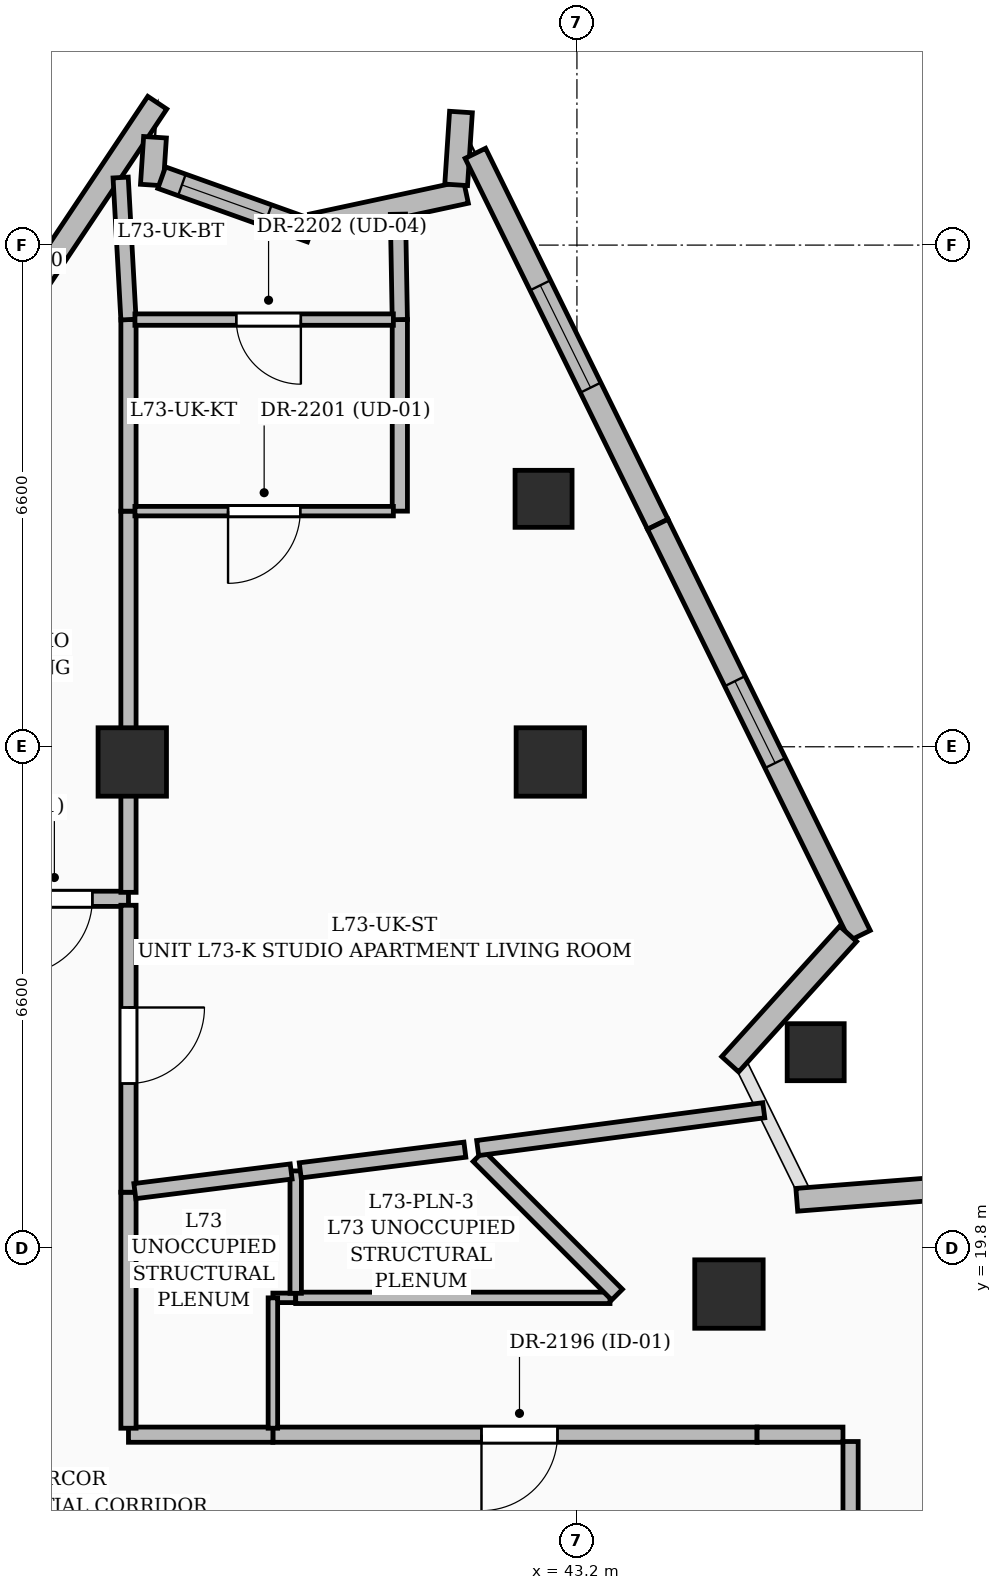
"""IFC4 building model, lengths in metres.
Left out: names, types, materials, properties, quantities, classifications, styles, units other than length and angle.
Written with IfcOpenShell. Run it as: python <this file> out.ifc"""

import sys

from ifc_helpers import new_model, si_unit, direction, frame, frame_2d, origin, origin_2d, place, context, subcontext, project, spatial, rectangle, extrude, element, fill, save


model = new_model("IFC4")
c1 = context("Model", 3, precision=1e-05, world=origin(), true_north=direction((0.0, 1.0)))
c2 = subcontext(c1, "Body", "Model", "MODEL_VIEW")
j1 = project(units=[si_unit("LENGTHUNIT", "METRE"), si_unit("PLANEANGLEUNIT", "RADIAN")], contexts=[c1])
p1 = place(None, origin())
s1 = spatial("IfcSite", under=j1, at=p1, CompositionType="ELEMENT")
p2 = place(p1, origin())
s2 = spatial("IfcBuilding", under=s1, at=p2, CompositionType="ELEMENT")
p3 = place(p2, frame((0.0, 0.0, 282.0)))
s3 = spatial("IfcBuildingStorey", under=s2, at=p3, CompositionType="ELEMENT", Elevation=282.0)
for number, where, z_axis, x_axis in (
    (1, (45.2, 19.2, 0.0), (0.0, 0.0, 1.0), (1.0, 0.0, 0.0)),
    (2, (42.85, 26.2, 0.0), (0.0, 0.0, 1.0), (1.0, 0.0, 0.0)),
    (3, (37.35, 26.2, 0.0), (0.0, 0.0, 1.0), (1.0, 0.0, 0.0)),
):
    element("IfcColumn", number, at=place(p3, frame(where, z_axis=z_axis, x_axis=x_axis)), inside=s3, PredefinedType="COLUMN", context=c2, shape_type="SweptSolid", body=[
        extrude(rectangle(XDim=0.9, YDim=0.9, at=origin_2d()), origin(), (0.0, 0.0, 1.0), 3.75),
    ])
for number, where, z_axis, x_axis in (
    (4, (46.341, 22.382, 0.0), (0.0, 0.0, 1.0), (1.0, 0.0, 0.0)),
    (5, (42.761, 29.662, 0.0), (0.0, 0.0, 1.0), (1.0, 0.0, 0.0)),
):
    element("IfcColumn", number, at=place(p3, frame(where, z_axis=z_axis, x_axis=x_axis)), inside=s3, PredefinedType="COLUMN", context=c2, shape_type="SweptSolid", body=[
        extrude(rectangle(XDim=0.75, YDim=0.75, at=origin_2d()), origin(), (0.0, 0.0, 1.0), 3.75),
    ])
p4 = place(p3, frame((34.191, 29.649, 0.0), z_axis=(0.0, 0.0, 1.0), x_axis=(0.555229286711, 0.831697324259, 0.0)))
e6 = element("IfcWall", 6, at=p4, inside=s3, PredefinedType="SOLIDWALL", context=c2, shape_type="SweptSolid", body=[
    extrude(rectangle(XDim=6.281, YDim=0.3, at=frame_2d((3.141, 0.0))), origin(), (0.0, 0.0, 1.0), 3.5),
])
p5 = place(p4, frame((1.8, 0.0, 0.8)))
e7 = element("IfcOpeningElement", 7, at=p5, cuts=e6, PredefinedType="OPENING", context=c2, shape_type="SweptSolid", body=[
    extrude(rectangle(XDim=1.2, YDim=1.8, at=frame_2d((0.6, 0.9))), frame((0.0, 0.16, 0.0), z_axis=(0.0, -1.0, 0.0), x_axis=(1.0, 0.0, 0.0)), (0.0, 0.0, 1.0), 0.32),
])
p6 = place(p3, frame((37.649, 34.419, 0.0), z_axis=(0.0, 0.0, 1.0), x_axis=(-0.065490172125, -0.997853214333, 0.0)))
e8 = element("IfcWall", 8, at=p6, inside=s3, PredefinedType="SOLIDWALL", context=c2, shape_type="SweptSolid", body=[
    extrude(rectangle(XDim=0.63, YDim=0.3, at=frame_2d((0.315, 0.0))), origin(), (0.0, 0.0, 1.0), 3.5),
])
p7 = place(p3, frame((37.737, 33.887, 0.0), z_axis=(0.0, 0.0, 1.0), x_axis=(0.941665242227, -0.336550994028, 0.0)))
e9 = element("IfcWall", 9, at=p7, inside=s3, PredefinedType="SOLIDWALL", context=c2, shape_type="SweptSolid", body=[
    extrude(rectangle(XDim=2.09, YDim=0.3, at=frame_2d((1.045, 0.0))), origin(), (0.0, 0.0, 1.0), 3.5),
])
p8 = place(p7, frame((0.283, 0.0, 0.8)))
e10 = element("IfcOpeningElement", 10, at=p8, cuts=e9, PredefinedType="OPENING", context=c2, shape_type="SweptSolid", body=[
    extrude(rectangle(XDim=1.2, YDim=1.8, at=frame_2d((0.6, 0.9))), frame((0.0, 0.16, 0.0), z_axis=(0.0, -1.0, 0.0), x_axis=(1.0, 0.0, 0.0)), (0.0, 0.0, 1.0), 0.32),
])
p9 = place(p3, frame((39.715, 33.261, 0.0), z_axis=(0.0, 0.0, 1.0), x_axis=(0.977601927603, 0.210462517201, 0.0)))
e11 = element("IfcWall", 11, at=p9, inside=s3, PredefinedType="SOLIDWALL", context=c2, shape_type="SweptSolid", body=[
    extrude(rectangle(XDim=2.072, YDim=0.3, at=frame_2d((1.036, 0.0))), origin(), (0.0, 0.0, 1.0), 3.5),
])
p10 = place(p3, frame((41.611, 33.793, 0.0), z_axis=(0.0, 0.0, 1.0), x_axis=(0.065860770899, 0.997828822422, 0.0)))
e12 = element("IfcWall", 12, at=p10, inside=s3, PredefinedType="SOLIDWALL", context=c2, shape_type="SweptSolid", body=[
    extrude(rectangle(XDim=0.96, YDim=0.3, at=frame_2d((0.48, 0.0))), origin(), (0.0, 0.0, 1.0), 3.5),
])
p11 = place(p3, frame((41.864, 34.207, 0.0), z_axis=(0.0, 0.0, 1.0), x_axis=(0.441278173843, -0.89737036573, 0.0)))
e13 = element("IfcWall", 13, at=p11, inside=s3, PredefinedType="SOLIDWALL", context=c2, shape_type="SweptSolid", body=[
    extrude(rectangle(XDim=5.438, YDim=0.3, at=frame_2d((2.719, 0.0))), origin(), (0.0, 0.0, 1.0), 3.5),
])
p12 = place(p11, frame((1.935, 0.0, 0.6)))
e14 = element("IfcOpeningElement", 14, at=p12, cuts=e13, PredefinedType="OPENING", context=c2, shape_type="SweptSolid", body=[
    extrude(rectangle(XDim=1.5, YDim=2.1, at=frame_2d((0.75, 1.05))), frame((0.0, 0.16, 0.0), z_axis=(0.0, -1.0, 0.0), x_axis=(1.0, 0.0, 0.0)), (0.0, 0.0, 1.0), 0.32),
])
p13 = place(p3, frame((44.263, 29.327, 0.0), z_axis=(0.0, 0.0, 1.0), x_axis=(0.441323397794, -0.897348125623, 0.0)))
e15 = element("IfcWall", 15, at=p13, inside=s3, PredefinedType="SOLIDWALL", context=c2, shape_type="SweptSolid", body=[
    extrude(rectangle(XDim=6.028, YDim=0.3, at=frame_2d((3.014, 0.0))), origin(), (0.0, 0.0, 1.0), 3.5),
])
p14 = place(p13, frame((2.3, 0.0, 0.8)))
e16 = element("IfcOpeningElement", 16, at=p14, cuts=e15, PredefinedType="OPENING", context=c2, shape_type="SweptSolid", body=[
    extrude(rectangle(XDim=1.2, YDim=1.8, at=frame_2d((0.6, 0.9))), frame((0.0, 0.16, 0.0), z_axis=(0.0, -1.0, 0.0), x_axis=(1.0, 0.0, 0.0)), (0.0, 0.0, 1.0), 0.32),
])
p15 = place(p3, frame((46.768, 23.939, 0.0), z_axis=(0.0, 0.0, 1.0), x_axis=(-0.670764114694, -0.741670750697, 0.0)))
e17 = element("IfcWall", 17, at=p15, inside=s3, PredefinedType="SOLIDWALL", context=c2, shape_type="SweptSolid", body=[
    extrude(rectangle(XDim=2.314, YDim=0.3, at=frame_2d((1.157, 0.0))), origin(), (0.0, 0.0, 1.0), 2.696),
])
p16 = place(p3, frame((46.092, 20.44, 0.0), z_axis=(0.0, 0.0, 1.0), x_axis=(0.996900868101, 0.078668031502, 0.0)))
e18 = element("IfcWall", 18, at=p16, inside=s3, PredefinedType="SOLIDWALL", context=c2, shape_type="SweptSolid", body=[
    extrude(rectangle(XDim=2.594, YDim=0.3, at=frame_2d((1.297, 0.0))), origin(), (0.0, 0.0, 1.0), 2.696),
])
p17 = place(p3, frame((45.57, 17.35, 0.0), z_axis=(0.0, 0.0, 1.0), x_axis=(-1.0, 0.0, 0.0)))
e19 = element("IfcWall", 19, at=p17, inside=s3, PredefinedType="PARTITIONING", context=c2, shape_type="SweptSolid", body=[
    extrude(rectangle(XDim=6.37, YDim=0.2, at=frame_2d((3.185, 0.0))), origin(), (0.0, 0.0, 1.0), 3.5),
])
p18 = place(p17, frame((2.626, 0.0, 0.0)))
e20 = element("IfcOpeningElement", 20, at=p18, cuts=e19, PredefinedType="OPENING", context=c2, shape_type="SweptSolid", body=[
    extrude(rectangle(XDim=1.0, YDim=2.2, at=frame_2d((0.5, 1.1))), frame((0.0, 0.11, 0.0), z_axis=(0.0, -1.0, 0.0), x_axis=(1.0, 0.0, 0.0)), (0.0, 0.0, 1.0), 0.22),
])
p19 = place(p3, frame((39.2, 17.35, 0.0), z_axis=(0.0, 0.0, 1.0), x_axis=(-1.0, 0.0, 0.0)))
e21 = element("IfcWall", 21, at=p19, inside=s3, PredefinedType="PARTITIONING", context=c2, shape_type="SweptSolid", body=[
    extrude(rectangle(XDim=1.9, YDim=0.2, at=frame_2d((0.95, 0.0))), origin(), (0.0, 0.0, 1.0), 3.5),
])
p20 = place(p3, frame((37.3, 17.435, 0.0), z_axis=(0.0, 0.0, 1.0), x_axis=(0.0, 1.0, 0.0)))
e22 = element("IfcWall", 22, at=p20, inside=s3, PredefinedType="PARTITIONING", context=c2, shape_type="SweptSolid", body=[
    extrude(rectangle(XDim=3.105, YDim=0.2, at=frame_2d((1.552, 0.0))), origin(), (0.0, 0.0, 1.0), 3.003),
])
p21 = place(p3, frame((37.3, 24.4, 0.0), z_axis=(0.0, 0.0, 1.0), x_axis=(-1.0, 0.0, 0.0)))
e23 = element("IfcWall", 23, at=p21, inside=s3, PredefinedType="PARTITIONING", context=c2, shape_type="SweptSolid", body=[
    extrude(rectangle(XDim=1.95, YDim=0.2, at=frame_2d((0.975, 0.0))), origin(), (0.0, 0.0, 1.0), 2.685),
])
p22 = place(p21, frame((0.475, 0.0, 0.0)))
e24 = element("IfcOpeningElement", 24, at=p22, cuts=e23, PredefinedType="OPENING", context=c2, shape_type="SweptSolid", body=[
    extrude(rectangle(XDim=1.0, YDim=2.2, at=frame_2d((0.5, 1.1))), frame((0.0, 0.11, 0.0), z_axis=(0.0, -1.0, 0.0), x_axis=(1.0, 0.0, 0.0)), (0.0, 0.0, 1.0), 0.22),
])
p23 = place(p3, frame((37.3, 24.315, 0.0), z_axis=(0.0, 0.0, 1.0), x_axis=(0.0, -1.0, 0.0)))
e25 = element("IfcWall", 25, at=p23, inside=s3, PredefinedType="PARTITIONING", context=c2, shape_type="SweptSolid", body=[
    extrude(rectangle(XDim=3.775, YDim=0.2, at=frame_2d((1.887, 0.0))), origin(), (0.0, 0.0, 1.0), 3.5),
])
p24 = place(p23, frame((1.345, 0.0, 0.0)))
e26 = element("IfcOpeningElement", 26, at=p24, cuts=e25, PredefinedType="OPENING", context=c2, shape_type="SweptSolid", body=[
    extrude(rectangle(XDim=1.0, YDim=2.2, at=frame_2d((0.5, 1.1))), frame((0.0, 0.11, 0.0), z_axis=(0.0, -1.0, 0.0), x_axis=(1.0, 0.0, 0.0)), (0.0, 0.0, 1.0), 0.22),
])
p25 = place(p3, frame((39.5, 19.15, 0.0), z_axis=(0.0, 0.0, 1.0), x_axis=(-1.0, 0.0, 0.0)))
e27 = element("IfcWall", 27, at=p25, inside=s3, PredefinedType="PARTITIONING", context=c2, shape_type="SweptSolid", body=[
    extrude(rectangle(XDim=0.3, YDim=0.125, at=frame_2d((0.15, 0.0))), origin(), (0.0, 0.0, 1.0), 3.003),
])
p26 = place(p3, frame((39.2, 19.15, 0.0), z_axis=(0.0, 0.0, 1.0), x_axis=(0.0, -1.0, 0.0)))
e28 = element("IfcWall", 28, at=p26, inside=s3, PredefinedType="PARTITIONING", context=c2, shape_type="SweptSolid", body=[
    extrude(rectangle(XDim=1.715, YDim=0.125, at=frame_2d((0.857, 0.0))), origin(), (0.0, 0.0, 1.0), 3.003),
])
p27 = place(p3, frame((43.635, 19.15, 0.0), z_axis=(0.0, 0.0, 1.0), x_axis=(-1.0, 0.0, 0.0)))
e29 = element("IfcWall", 29, at=p27, inside=s3, PredefinedType="PARTITIONING", context=c2, shape_type="SweptSolid", body=[
    extrude(rectangle(XDim=4.135, YDim=0.15, at=frame_2d((2.067, 0.0))), origin(), (0.0, 0.0, 1.0), 3.003),
])
p28 = place(p3, frame((39.5, 19.21, 0.0), z_axis=(0.0, 0.0, 1.0), x_axis=(0.0, 1.0, 0.0)))
e30 = element("IfcWall", 30, at=p28, inside=s3, PredefinedType="PARTITIONING", context=c2, shape_type="SweptSolid", body=[
    extrude(rectangle(XDim=1.61, YDim=0.15, at=frame_2d((0.805, 0.0))), origin(), (0.0, 0.0, 1.0), 3.003),
])
p29 = place(p3, frame((39.44, 20.812, 0.0), z_axis=(0.0, 0.0, 1.0), x_axis=(-0.992205225353, -0.124614568901, 0.0)))
e31 = element("IfcWall", 31, at=p29, inside=s3, PredefinedType="PARTITIONING", context=c2, shape_type="SweptSolid", body=[
    extrude(rectangle(XDim=2.073, YDim=0.2, at=frame_2d((1.036, 0.0))), origin(), (0.0, 0.0, 1.0), 3.5),
])
p30 = place(p3, frame((43.728, 19.192, 0.0), z_axis=(0.0, 0.0, 1.0), x_axis=(-0.707106781187, 0.707106781187, 0.0)))
e32 = element("IfcWall", 32, at=p30, inside=s3, PredefinedType="PARTITIONING", context=c2, shape_type="SweptSolid", body=[
    extrude(rectangle(XDim=2.577, YDim=0.2, at=frame_2d((1.288, 0.0))), origin(), (0.0, 0.0, 1.0), 3.003),
])
p31 = place(p3, frame((45.658, 21.618, 0.0), z_axis=(0.0, 0.0, 1.0), x_axis=(-0.991399485906, -0.1308703914, 0.0)))
e33 = element("IfcWall", 33, at=p31, inside=s3, PredefinedType="PARTITIONING", context=c2, shape_type="SweptSolid", body=[
    extrude(rectangle(XDim=3.796, YDim=0.2, at=frame_2d((1.898, 0.0))), origin(), (0.0, 0.0, 1.0), 2.685),
])
p32 = place(p3, frame((37.3, 24.485, 0.0), z_axis=(0.0, 0.0, 1.0), x_axis=(0.0, 1.0, 0.0)))
e34 = element("IfcWall", 34, at=p32, inside=s3, PredefinedType="PARTITIONING", context=c2, shape_type="SweptSolid", body=[
    extrude(rectangle(XDim=5.015, YDim=0.2, at=frame_2d((2.507, 0.0))), origin(), (0.0, 0.0, 1.0), 2.685),
])
p33 = place(p3, frame((37.3, 29.5, 0.0), z_axis=(0.0, 0.0, 1.0), x_axis=(0.0, 1.0, 0.0)))
e35 = element("IfcWall", 35, at=p33, inside=s3, PredefinedType="PARTITIONING", context=c2, shape_type="SweptSolid", body=[
    extrude(rectangle(XDim=2.52, YDim=0.2, at=frame_2d((1.26, 0.0))), origin(), (0.0, 0.0, 1.0), 2.691),
])
p34 = place(p3, frame((37.3, 32.02, 0.0), z_axis=(0.0, 0.0, 1.0), x_axis=(-0.055043791408, 0.998483941297, 0.0)))
e36 = element("IfcWall", 36, at=p34, inside=s3, PredefinedType="PARTITIONING", context=c2, shape_type="SweptSolid", body=[
    extrude(rectangle(XDim=1.872, YDim=0.2, at=frame_2d((0.936, 0.0))), origin(), (0.0, 0.0, 1.0), 3.5),
])
p35 = place(p3, frame((40.87, 32.02, 0.0), z_axis=(0.0, 0.0, 1.0), x_axis=(0.0, -1.0, 0.0)))
e37 = element("IfcWall", 37, at=p35, inside=s3, PredefinedType="PARTITIONING", context=c2, shape_type="SweptSolid", body=[
    extrude(rectangle(XDim=2.52, YDim=0.2, at=frame_2d((1.26, 0.0))), origin(), (0.0, 0.0, 1.0), 2.691),
])
p36 = place(p3, frame((40.845, 33.406, 0.0), z_axis=(0.0, 0.0, 1.0), x_axis=(0.018140400086, -0.999835449404, 0.0)))
e38 = element("IfcWall", 38, at=p36, inside=s3, PredefinedType="PARTITIONING", context=c2, shape_type="SweptSolid", body=[
    extrude(rectangle(XDim=1.386, YDim=0.2, at=frame_2d((0.693, 0.0))), origin(), (0.0, 0.0, 1.0), 3.5),
])
p37 = place(p3, frame((40.785, 29.5, 0.0), z_axis=(0.0, 0.0, 1.0), x_axis=(-1.0, 0.0, 0.0)))
e39 = element("IfcWall", 39, at=p37, inside=s3, PredefinedType="PARTITIONING", context=c2, shape_type="SweptSolid", body=[
    extrude(rectangle(XDim=3.4, YDim=0.125, at=frame_2d((1.7, 0.0))), origin(), (0.0, 0.0, 1.0), 2.691),
])
p38 = place(p37, frame((1.225, 0.0, 0.0)))
e40 = element("IfcOpeningElement", 40, at=p38, cuts=e39, PredefinedType="OPENING", context=c2, shape_type="SweptSolid", body=[
    extrude(rectangle(XDim=0.95, YDim=2.2, at=frame_2d((0.475, 1.1))), frame((0.0, 0.072, 0.0), z_axis=(0.0, -1.0, 0.0), x_axis=(1.0, 0.0, 0.0)), (0.0, 0.0, 1.0), 0.145),
])
p39 = place(p3, frame((40.785, 32.02, 0.0), z_axis=(0.0, 0.0, 1.0), x_axis=(-1.0, 0.0, 0.0)))
e41 = element("IfcWall", 41, at=p39, inside=s3, PredefinedType="PARTITIONING", context=c2, shape_type="SweptSolid", body=[
    extrude(rectangle(XDim=3.4, YDim=0.15, at=frame_2d((1.7, 0.0))), origin(), (0.0, 0.0, 1.0), 3.5),
])
p40 = place(p39, frame((1.217, 0.0, 0.0)))
e42 = element("IfcOpeningElement", 42, at=p40, cuts=e41, PredefinedType="OPENING", context=c2, shape_type="SweptSolid", body=[
    extrude(rectangle(XDim=0.85, YDim=2.1, at=frame_2d((0.425, 1.05))), frame((0.0, 0.085, 0.0), z_axis=(0.0, -1.0, 0.0), x_axis=(1.0, 0.0, 0.0)), (0.0, 0.0, 1.0), 0.17),
])
p41 = place(p3, frame((46.7, 17.35, 0.0), z_axis=(0.0, 0.0, 1.0), x_axis=(-1.0, 0.0, 0.0)))
e43 = element("IfcWall", 43, at=p41, inside=s3, PredefinedType="PARTITIONING", context=c2, shape_type="SweptSolid", body=[
    extrude(rectangle(XDim=1.13, YDim=0.2, at=frame_2d((0.565, 0.0))), origin(), (0.0, 0.0, 1.0), 2.685),
])
p42 = place(p3, frame((46.8, 15.05, 0.0), z_axis=(0.0, 0.0, 1.0), x_axis=(0.0, 1.0, 0.0)))
e44 = element("IfcWall", 44, at=p42, inside=s3, PredefinedType="PARTITIONING", context=c2, shape_type="SweptSolid", body=[
    extrude(rectangle(XDim=2.21, YDim=0.2, at=frame_2d((1.105, 0.0))), origin(), (0.0, 0.0, 1.0), 2.685),
])
p43 = place(p3, frame((41.726, 21.099, 0.0), z_axis=(0.0, 0.0, 1.0), x_axis=(-0.992208901819, -0.124585292677, 0.0)))
e45 = element("IfcWall", 45, at=p43, inside=s3, PredefinedType="PARTITIONING", context=c2, shape_type="SweptSolid", body=[
    extrude(rectangle(XDim=2.183, YDim=0.2, at=frame_2d((1.092, 0.0))), origin(), (0.0, 0.0, 1.0), 3.5),
])
p44 = place(p8, origin())
e46 = element("IfcWindow", 46, at=p44, inside=s3, PartitioningType="SINGLE_PANEL", PredefinedType="WINDOW", context=c2, shape_type="SweptSolid", body=[
    extrude(rectangle(XDim=1.2, YDim=1.8, at=frame_2d((0.6, 0.9))), frame((0.0, 0.03, 0.0), z_axis=(0.0, -1.0, 0.0), x_axis=(1.0, 0.0, 0.0)), (0.0, 0.0, 1.0), 0.06),
])
fill(e10, e46)
p45 = place(p12, origin())
e47 = element("IfcWindow", 47, at=p45, inside=s3, PartitioningType="SINGLE_PANEL", PredefinedType="WINDOW", context=c2, shape_type="SweptSolid", body=[
    extrude(rectangle(XDim=1.5, YDim=2.1, at=frame_2d((0.75, 1.05))), frame((0.0, 0.03, 0.0), z_axis=(0.0, -1.0, 0.0), x_axis=(1.0, 0.0, 0.0)), (0.0, 0.0, 1.0), 0.06),
])
fill(e14, e47)
p46 = place(p14, origin())
e48 = element("IfcWindow", 48, at=p46, inside=s3, PartitioningType="SINGLE_PANEL", PredefinedType="WINDOW", context=c2, shape_type="SweptSolid", body=[
    extrude(rectangle(XDim=1.2, YDim=1.8, at=frame_2d((0.6, 0.9))), frame((0.0, 0.03, 0.0), z_axis=(0.0, -1.0, 0.0), x_axis=(1.0, 0.0, 0.0)), (0.0, 0.0, 1.0), 0.06),
])
fill(e16, e48)
p47 = place(p18, origin())
e49 = element("IfcDoor", 49, at=p47, inside=s3, OperationType="SINGLE_SWING_RIGHT", PredefinedType="DOOR", context=c2, shape_type="SweptSolid", body=[
    extrude(rectangle(XDim=1.0, YDim=2.2, at=frame_2d((0.5, 1.1))), frame((0.0, 0.025, 0.0), z_axis=(0.0, -1.0, 0.0), x_axis=(1.0, 0.0, 0.0)), (0.0, 0.0, 1.0), 0.05),
])
fill(e20, e49)
p48 = place(p22, origin())
e50 = element("IfcDoor", 50, at=p48, inside=s3, OperationType="SINGLE_SWING_RIGHT", PredefinedType="DOOR", context=c2, shape_type="SweptSolid", body=[
    extrude(rectangle(XDim=1.0, YDim=2.2, at=frame_2d((0.5, 1.1))), frame((0.0, 0.025, 0.0), z_axis=(0.0, -1.0, 0.0), x_axis=(1.0, 0.0, 0.0)), (0.0, 0.0, 1.0), 0.05),
])
fill(e24, e50)
p49 = place(p24, origin())
e51 = element("IfcDoor", 51, at=p49, inside=s3, OperationType="SINGLE_SWING_LEFT", PredefinedType="DOOR", context=c2, shape_type="SweptSolid", body=[
    extrude(rectangle(XDim=1.0, YDim=2.2, at=frame_2d((0.5, 1.1))), frame((0.0, 0.025, 0.0), z_axis=(0.0, -1.0, 0.0), x_axis=(1.0, 0.0, 0.0)), (0.0, 0.0, 1.0), 0.05),
])
fill(e26, e51)
p50 = place(p38, origin())
e52 = element("IfcDoor", 52, at=p50, inside=s3, OperationType="SINGLE_SWING_RIGHT", PredefinedType="DOOR", context=c2, shape_type="SweptSolid", body=[
    extrude(rectangle(XDim=0.95, YDim=2.2, at=frame_2d((0.475, 1.1))), frame((0.0, 0.025, 0.0), z_axis=(0.0, -1.0, 0.0), x_axis=(1.0, 0.0, 0.0)), (0.0, 0.0, 1.0), 0.05),
])
fill(e40, e52)
p51 = place(p40, origin())
e53 = element("IfcDoor", 53, at=p51, inside=s3, OperationType="SINGLE_SWING_LEFT", PredefinedType="DOOR", context=c2, shape_type="SweptSolid", body=[
    extrude(rectangle(XDim=0.85, YDim=2.1, at=frame_2d((0.425, 1.05))), frame((0.0, 0.025, 0.0), z_axis=(0.0, -1.0, 0.0), x_axis=(1.0, 0.0, 0.0)), (0.0, 0.0, 1.0), 0.05),
])
fill(e42, e53)
save(model, sys.argv[1])
